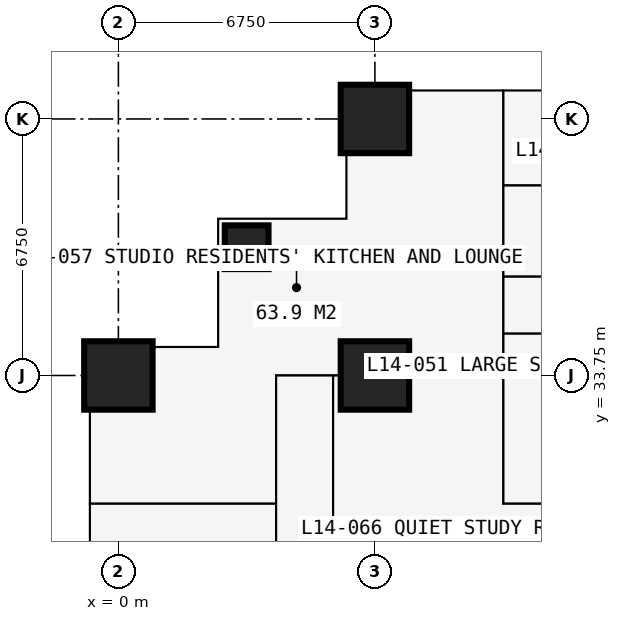
"""IFC4 building model, lengths in metres.
Left out: names, types, materials, properties, quantities, classifications, styles, units other than length and angle.
Written with IfcOpenShell. Run it as: python <this file> out.ifc"""

import sys

from ifc_helpers import new_model, si_unit, direction, frame, frame_2d, origin, origin_2d, place, context, subcontext, project, spatial, rectangle, extrude, element, fill, save


model = new_model("IFC4")
c1 = context("Model", 3, precision=1e-05, world=origin(), true_north=direction((0.0, 1.0)))
c2 = subcontext(c1, "Body", "Model", "MODEL_VIEW")
j1 = project(units=[si_unit("LENGTHUNIT", "METRE"), si_unit("PLANEANGLEUNIT", "RADIAN")], contexts=[c1])
p1 = place(None, origin())
s1 = spatial("IfcSite", under=j1, at=p1, CompositionType="ELEMENT")
p2 = place(p1, origin())
s2 = spatial("IfcBuilding", under=s1, at=p2, CompositionType="ELEMENT")
p3 = place(p2, frame((0.0, 0.0, 54.0)))
s3 = spatial("IfcBuildingStorey", under=s2, at=p3, CompositionType="ELEMENT", Elevation=54.0)
p4 = place(p3, frame((0.0, 33.75, 0.0), z_axis=(0.0, 0.0, 1.0), x_axis=(1.0, 0.0, 0.0)))
e1 = element("IfcColumn", 1, at=p4, inside=s3, PredefinedType="COLUMN", context=c2, shape_type="SweptSolid", body=[
    extrude(rectangle(XDim=1.8, YDim=1.8, at=origin_2d()), origin(), (0.0, 0.0, 1.0), 3.6),
])
p5 = place(p3, frame((3.375, 37.125, 0.0), z_axis=(0.0, 0.0, 1.0), x_axis=(1.0, 0.0, 0.0)))
e2 = element("IfcColumn", 2, at=p5, inside=s3, PredefinedType="COLUMN", context=c2, shape_type="SweptSolid", body=[
    extrude(rectangle(XDim=1.15, YDim=1.15, at=origin_2d()), origin(), (0.0, 0.0, 1.0), 3.6),
])
for number, where, z_axis, x_axis in (
    (3, (6.75, 33.75, 0.0), (0.0, 0.0, 1.0), (1.0, 0.0, 0.0)),
    (4, (6.75, 40.5, 0.0), (0.0, 0.0, 1.0), (1.0, 0.0, 0.0)),
):
    element("IfcColumn", number, at=place(p3, frame(where, z_axis=z_axis, x_axis=x_axis)), inside=s3, PredefinedType="COLUMN", context=c2, shape_type="SweptSolid", body=[
        extrude(rectangle(XDim=1.8, YDim=1.8, at=origin_2d()), origin(), (0.0, 0.0, 1.0), 3.6),
    ])
p6 = place(p3, frame((6.0, 41.25, 0.0), z_axis=(0.0, 0.0, 1.0), x_axis=(0.0, -1.0, 0.0)))
e5 = element("IfcWall", 5, at=p6, inside=s3, PredefinedType="SOLIDWALL", context=c2, shape_type="SweptSolid", body=[
    extrude(rectangle(XDim=3.375, YDim=0.3, at=frame_2d((1.688, 0.0))), origin(), (0.0, 0.0, 1.0), 3.375),
])
p7 = place(p6, frame((1.833, 0.0, 0.9)))
e6 = element("IfcOpeningElement", 6, at=p7, cuts=e5, PredefinedType="OPENING", context=c2, shape_type="SweptSolid", body=[
    extrude(rectangle(XDim=1.2, YDim=1.8, at=frame_2d((0.6, 0.9))), frame((0.0, 0.16, 0.0), z_axis=(0.0, -1.0, 0.0), x_axis=(1.0, 0.0, 0.0)), (0.0, 0.0, 1.0), 0.32),
])
p8 = place(p3, frame((6.0, 37.875, 0.0), z_axis=(0.0, 0.0, 1.0), x_axis=(-1.0, 0.0, 0.0)))
e7 = element("IfcWall", 7, at=p8, inside=s3, PredefinedType="SOLIDWALL", context=c2, shape_type="SweptSolid", body=[
    extrude(rectangle(XDim=3.375, YDim=0.3, at=frame_2d((1.688, 0.0))), origin(), (0.0, 0.0, 1.0), 3.375),
])
p9 = place(p8, frame((0.788, 0.0, 0.6)))
e8 = element("IfcOpeningElement", 8, at=p9, cuts=e7, PredefinedType="OPENING", context=c2, shape_type="SweptSolid", body=[
    extrude(rectangle(XDim=1.8, YDim=2.1, at=frame_2d((0.9, 1.05))), frame((0.0, 0.16, 0.0), z_axis=(0.0, -1.0, 0.0), x_axis=(1.0, 0.0, 0.0)), (0.0, 0.0, 1.0), 0.32),
])
p10 = place(p3, frame((2.625, 37.875, 0.0), z_axis=(0.0, 0.0, 1.0), x_axis=(0.0, -1.0, 0.0)))
e9 = element("IfcWall", 9, at=p10, inside=s3, PredefinedType="SOLIDWALL", context=c2, shape_type="SweptSolid", body=[
    extrude(rectangle(XDim=3.375, YDim=0.3, at=frame_2d((1.688, 0.0))), origin(), (0.0, 0.0, 1.0), 3.375),
])
p11 = place(p10, frame((0.788, 0.0, 0.6)))
e10 = element("IfcOpeningElement", 10, at=p11, cuts=e9, PredefinedType="OPENING", context=c2, shape_type="SweptSolid", body=[
    extrude(rectangle(XDim=1.8, YDim=2.1, at=frame_2d((0.9, 1.05))), frame((0.0, 0.16, 0.0), z_axis=(0.0, -1.0, 0.0), x_axis=(1.0, 0.0, 0.0)), (0.0, 0.0, 1.0), 0.32),
])
p12 = place(p3, frame((2.625, 34.5, 0.0), z_axis=(0.0, 0.0, 1.0), x_axis=(-1.0, 0.0, 0.0)))
e11 = element("IfcWall", 11, at=p12, inside=s3, PredefinedType="SOLIDWALL", context=c2, shape_type="SweptSolid", body=[
    extrude(rectangle(XDim=3.375, YDim=0.3, at=frame_2d((1.688, 0.0))), origin(), (0.0, 0.0, 1.0), 3.375),
])
p13 = place(p12, frame((0.343, 0.0, 0.9)))
e12 = element("IfcOpeningElement", 12, at=p13, cuts=e11, PredefinedType="OPENING", context=c2, shape_type="SweptSolid", body=[
    extrude(rectangle(XDim=1.2, YDim=1.8, at=frame_2d((0.6, 0.9))), frame((0.0, 0.16, 0.0), z_axis=(0.0, -1.0, 0.0), x_axis=(1.0, 0.0, 0.0)), (0.0, 0.0, 1.0), 0.32),
])
p14 = place(p3, frame((-0.734, 30.375, 0.0), z_axis=(0.0, 0.0, 1.0), x_axis=(1.0, 0.0, 0.0)))
e13 = element("IfcWall", 13, at=p14, inside=s3, PredefinedType="PARTITIONING", context=c2, shape_type="SweptSolid", body=[
    extrude(rectangle(XDim=4.884, YDim=0.15, at=frame_2d((2.442, 0.0))), origin(), (0.0, 0.0, 1.0), 3.375),
])
p15 = place(p3, frame((4.15, 10.125, 0.0), z_axis=(0.0, 0.0, 1.0), x_axis=(0.0, 1.0, 0.0)))
e14 = element("IfcWall", 14, at=p15, inside=s3, PredefinedType="PARTITIONING", context=c2, shape_type="SweptSolid", body=[
    extrude(rectangle(XDim=23.625, YDim=0.15, at=frame_2d((11.812, 0.0))), origin(), (0.0, 0.0, 1.0), 3.375),
])
p16 = place(p15, frame((4.2, 0.0, 0.0)))
e15 = element("IfcOpeningElement", 15, at=p16, cuts=e14, PredefinedType="OPENING", context=c2, shape_type="SweptSolid", body=[
    extrude(rectangle(XDim=0.95, YDim=2.2, at=frame_2d((0.475, 1.1))), frame((0.0, 0.085, 0.0), z_axis=(0.0, -1.0, 0.0), x_axis=(1.0, 0.0, 0.0)), (0.0, 0.0, 1.0), 0.17),
])
p17 = place(p15, frame((10.95, 0.0, 0.0)))
e16 = element("IfcOpeningElement", 16, at=p17, cuts=e14, PredefinedType="OPENING", context=c2, shape_type="SweptSolid", body=[
    extrude(rectangle(XDim=0.95, YDim=2.2, at=frame_2d((0.475, 1.1))), frame((0.0, 0.085, 0.0), z_axis=(0.0, -1.0, 0.0), x_axis=(1.0, 0.0, 0.0)), (0.0, 0.0, 1.0), 0.17),
])
p18 = place(p15, frame((17.7, 0.0, 0.0)))
e17 = element("IfcOpeningElement", 17, at=p18, cuts=e14, PredefinedType="OPENING", context=c2, shape_type="SweptSolid", body=[
    extrude(rectangle(XDim=0.95, YDim=2.2, at=frame_2d((0.475, 1.1))), frame((0.0, 0.085, 0.0), z_axis=(0.0, -1.0, 0.0), x_axis=(1.0, 0.0, 0.0)), (0.0, 0.0, 1.0), 0.17),
])
p19 = place(p3, frame((4.15, 33.75, 0.0), z_axis=(0.0, 0.0, 1.0), x_axis=(1.0, 0.0, 0.0)))
e18 = element("IfcWall", 18, at=p19, inside=s3, PredefinedType="PARTITIONING", context=c2, shape_type="SweptSolid", body=[
    extrude(rectangle(XDim=5.975, YDim=0.15, at=frame_2d((2.988, 0.0))), origin(), (0.0, 0.0, 1.0), 2.877),
])
p20 = place(p3, frame((5.65, 22.988, 0.0), z_axis=(0.0, 0.0, 1.0), x_axis=(0.0, 1.0, 0.0)))
e19 = element("IfcWall", 19, at=p20, inside=s3, PredefinedType="PARTITIONING", context=c2, shape_type="SweptSolid", body=[
    extrude(rectangle(XDim=10.762, YDim=0.15, at=frame_2d((5.381, 0.0))), origin(), (0.0, 0.0, 1.0), 3.375),
])
p21 = place(p20, frame((4.95, 0.0, 0.0)))
e20 = element("IfcOpeningElement", 20, at=p21, cuts=e19, PredefinedType="OPENING", context=c2, shape_type="SweptSolid", body=[
    extrude(rectangle(XDim=0.95, YDim=2.2, at=frame_2d((0.475, 1.1))), frame((0.0, 0.085, 0.0), z_axis=(0.0, -1.0, 0.0), x_axis=(1.0, 0.0, 0.0)), (0.0, 0.0, 1.0), 0.17),
])
p22 = place(p3, frame((10.125, 30.375, 0.0), z_axis=(0.0, 0.0, 1.0), x_axis=(0.0, 1.0, 0.0)))
e21 = element("IfcWall", 21, at=p22, inside=s3, PredefinedType="PARTITIONING", context=c2, shape_type="SweptSolid", body=[
    extrude(rectangle(XDim=10.859, YDim=0.15, at=frame_2d((5.429, 0.0))), origin(), (0.0, 0.0, 1.0), 3.375),
])
p23 = place(p22, frame((4.725, 0.0, 0.0)))
e22 = element("IfcOpeningElement", 22, at=p23, cuts=e21, PredefinedType="OPENING", context=c2, shape_type="SweptSolid", body=[
    extrude(rectangle(XDim=1.0, YDim=2.2, at=frame_2d((0.5, 1.1))), frame((0.0, 0.085, 0.0), z_axis=(0.0, -1.0, 0.0), x_axis=(1.0, 0.0, 0.0)), (0.0, 0.0, 1.0), 0.17),
])
p24 = place(p3, frame((10.125, 30.375, 0.0), z_axis=(0.0, 0.0, 1.0), x_axis=(1.0, 0.0, 0.0)))
e23 = element("IfcWall", 23, at=p24, inside=s3, PredefinedType="PARTITIONING", context=c2, shape_type="SweptSolid", body=[
    extrude(rectangle(XDim=1.175, YDim=0.15, at=frame_2d((0.587, 0.0))), origin(), (0.0, 0.0, 1.0), 3.375),
])
p25 = place(p3, frame((10.125, 34.85, 0.0), z_axis=(0.0, 0.0, 1.0), x_axis=(1.0, 0.0, 0.0)))
e24 = element("IfcWall", 24, at=p25, inside=s3, PredefinedType="PARTITIONING", context=c2, shape_type="SweptSolid", body=[
    extrude(rectangle(XDim=10.762, YDim=0.15, at=frame_2d((5.381, 0.0))), origin(), (0.0, 0.0, 1.0), 3.375),
])
p26 = place(p25, frame((4.9, 0.0, 0.0)))
e25 = element("IfcOpeningElement", 25, at=p26, cuts=e24, PredefinedType="OPENING", context=c2, shape_type="SweptSolid", body=[
    extrude(rectangle(XDim=0.95, YDim=2.2, at=frame_2d((0.475, 1.1))), frame((0.0, 0.085, 0.0), z_axis=(0.0, -1.0, 0.0), x_axis=(1.0, 0.0, 0.0)), (0.0, 0.0, 1.0), 0.17),
])
p27 = place(p3, frame((10.125, 36.35, 0.0), z_axis=(0.0, 0.0, 1.0), x_axis=(1.0, 0.0, 0.0)))
e26 = element("IfcWall", 26, at=p27, inside=s3, PredefinedType="PARTITIONING", context=c2, shape_type="SweptSolid", body=[
    extrude(rectangle(XDim=23.625, YDim=0.15, at=frame_2d((11.812, 0.0))), origin(), (0.0, 0.0, 1.0), 3.375),
])
p28 = place(p27, frame((20.5, 0.0, 0.0)))
e27 = element("IfcOpeningElement", 27, at=p28, cuts=e26, PredefinedType="OPENING", context=c2, shape_type="SweptSolid", body=[
    extrude(rectangle(XDim=0.95, YDim=2.2, at=frame_2d((0.475, 1.1))), frame((0.0, 0.085, 0.0), z_axis=(0.0, -1.0, 0.0), x_axis=(1.0, 0.0, 0.0)), (0.0, 0.0, 1.0), 0.17),
])
p29 = place(p27, frame((17.125, 0.0, 0.0)))
e28 = element("IfcOpeningElement", 28, at=p29, cuts=e26, PredefinedType="OPENING", context=c2, shape_type="SweptSolid", body=[
    extrude(rectangle(XDim=0.95, YDim=2.2, at=frame_2d((0.475, 1.1))), frame((0.0, 0.085, 0.0), z_axis=(0.0, -1.0, 0.0), x_axis=(1.0, 0.0, 0.0)), (0.0, 0.0, 1.0), 0.17),
])
p30 = place(p27, frame((13.7, 0.0, 0.0)))
e29 = element("IfcOpeningElement", 29, at=p30, cuts=e26, PredefinedType="OPENING", context=c2, shape_type="SweptSolid", body=[
    extrude(rectangle(XDim=0.95, YDim=2.2, at=frame_2d((0.475, 1.1))), frame((0.0, 0.085, 0.0), z_axis=(0.0, -1.0, 0.0), x_axis=(1.0, 0.0, 0.0)), (0.0, 0.0, 1.0), 0.17),
])
p31 = place(p27, frame((4.2, 0.0, 0.0)))
e30 = element("IfcOpeningElement", 30, at=p31, cuts=e26, PredefinedType="OPENING", context=c2, shape_type="SweptSolid", body=[
    extrude(rectangle(XDim=0.95, YDim=2.2, at=frame_2d((0.475, 1.1))), frame((0.0, 0.085, 0.0), z_axis=(0.0, -1.0, 0.0), x_axis=(1.0, 0.0, 0.0)), (0.0, 0.0, 1.0), 0.17),
])
p32 = place(p27, frame((10.95, 0.0, 0.0)))
e31 = element("IfcOpeningElement", 31, at=p32, cuts=e26, PredefinedType="OPENING", context=c2, shape_type="SweptSolid", body=[
    extrude(rectangle(XDim=0.95, YDim=2.2, at=frame_2d((0.475, 1.1))), frame((0.0, 0.085, 0.0), z_axis=(0.0, -1.0, 0.0), x_axis=(1.0, 0.0, 0.0)), (0.0, 0.0, 1.0), 0.17),
])
p33 = place(p3, frame((10.125, 38.75, 0.0), z_axis=(0.0, 0.0, 1.0), x_axis=(1.0, 0.0, 0.0)))
e32 = element("IfcWall", 32, at=p33, inside=s3, PredefinedType="PARTITIONING", context=c2, shape_type="SweptSolid", body=[
    extrude(rectangle(XDim=2.6, YDim=0.1, at=frame_2d((1.3, 0.0))), origin(), (0.0, 0.0, 1.0), 3.375),
])
p34 = place(p33, frame((0.85, 0.0, 0.0)))
e33 = element("IfcOpeningElement", 33, at=p34, cuts=e32, PredefinedType="OPENING", context=c2, shape_type="SweptSolid", body=[
    extrude(rectangle(XDim=0.9, YDim=2.2, at=frame_2d((0.45, 1.1))), frame((0.0, 0.06, 0.0), z_axis=(0.0, -1.0, 0.0), x_axis=(1.0, 0.0, 0.0)), (0.0, 0.0, 1.0), 0.12),
])
p35 = place(p7, origin())
e34 = element("IfcWindow", 34, at=p35, inside=s3, PartitioningType="SINGLE_PANEL", PredefinedType="WINDOW", context=c2, shape_type="SweptSolid", body=[
    extrude(rectangle(XDim=1.2, YDim=1.8, at=frame_2d((0.6, 0.9))), frame((0.0, 0.03, 0.0), z_axis=(0.0, -1.0, 0.0), x_axis=(1.0, 0.0, 0.0)), (0.0, 0.0, 1.0), 0.06),
])
fill(e6, e34)
p36 = place(p9, origin())
e35 = element("IfcWindow", 35, at=p36, inside=s3, PartitioningType="SINGLE_PANEL", PredefinedType="WINDOW", context=c2, shape_type="SweptSolid", body=[
    extrude(rectangle(XDim=1.8, YDim=2.1, at=frame_2d((0.9, 1.05))), frame((0.0, 0.03, 0.0), z_axis=(0.0, -1.0, 0.0), x_axis=(1.0, 0.0, 0.0)), (0.0, 0.0, 1.0), 0.06),
])
fill(e8, e35)
p37 = place(p11, origin())
e36 = element("IfcWindow", 36, at=p37, inside=s3, PartitioningType="SINGLE_PANEL", PredefinedType="WINDOW", context=c2, shape_type="SweptSolid", body=[
    extrude(rectangle(XDim=1.8, YDim=2.1, at=frame_2d((0.9, 1.05))), frame((0.0, 0.03, 0.0), z_axis=(0.0, -1.0, 0.0), x_axis=(1.0, 0.0, 0.0)), (0.0, 0.0, 1.0), 0.06),
])
fill(e10, e36)
p38 = place(p13, origin())
e37 = element("IfcWindow", 37, at=p38, inside=s3, PartitioningType="SINGLE_PANEL", PredefinedType="WINDOW", context=c2, shape_type="SweptSolid", body=[
    extrude(rectangle(XDim=1.2, YDim=1.8, at=frame_2d((0.6, 0.9))), frame((0.0, 0.03, 0.0), z_axis=(0.0, -1.0, 0.0), x_axis=(1.0, 0.0, 0.0)), (0.0, 0.0, 1.0), 0.06),
])
fill(e12, e37)
p39 = place(p34, origin())
e38 = element("IfcDoor", 38, at=p39, inside=s3, OperationType="SINGLE_SWING_RIGHT", PredefinedType="DOOR", context=c2, shape_type="SweptSolid", body=[
    extrude(rectangle(XDim=0.9, YDim=2.2, at=frame_2d((0.45, 1.1))), frame((0.0, 0.025, 0.0), z_axis=(0.0, -1.0, 0.0), x_axis=(1.0, 0.0, 0.0)), (0.0, 0.0, 1.0), 0.05),
])
fill(e33, e38)
p40 = place(p23, origin())
e39 = element("IfcDoor", 39, at=p40, inside=s3, OperationType="SINGLE_SWING_LEFT", PredefinedType="DOOR", context=c2, shape_type="SweptSolid", body=[
    extrude(rectangle(XDim=1.0, YDim=2.2, at=frame_2d((0.5, 1.1))), frame((0.0, 0.025, 0.0), z_axis=(0.0, -1.0, 0.0), x_axis=(1.0, 0.0, 0.0)), (0.0, 0.0, 1.0), 0.05),
])
fill(e22, e39)
save(model, sys.argv[1])
